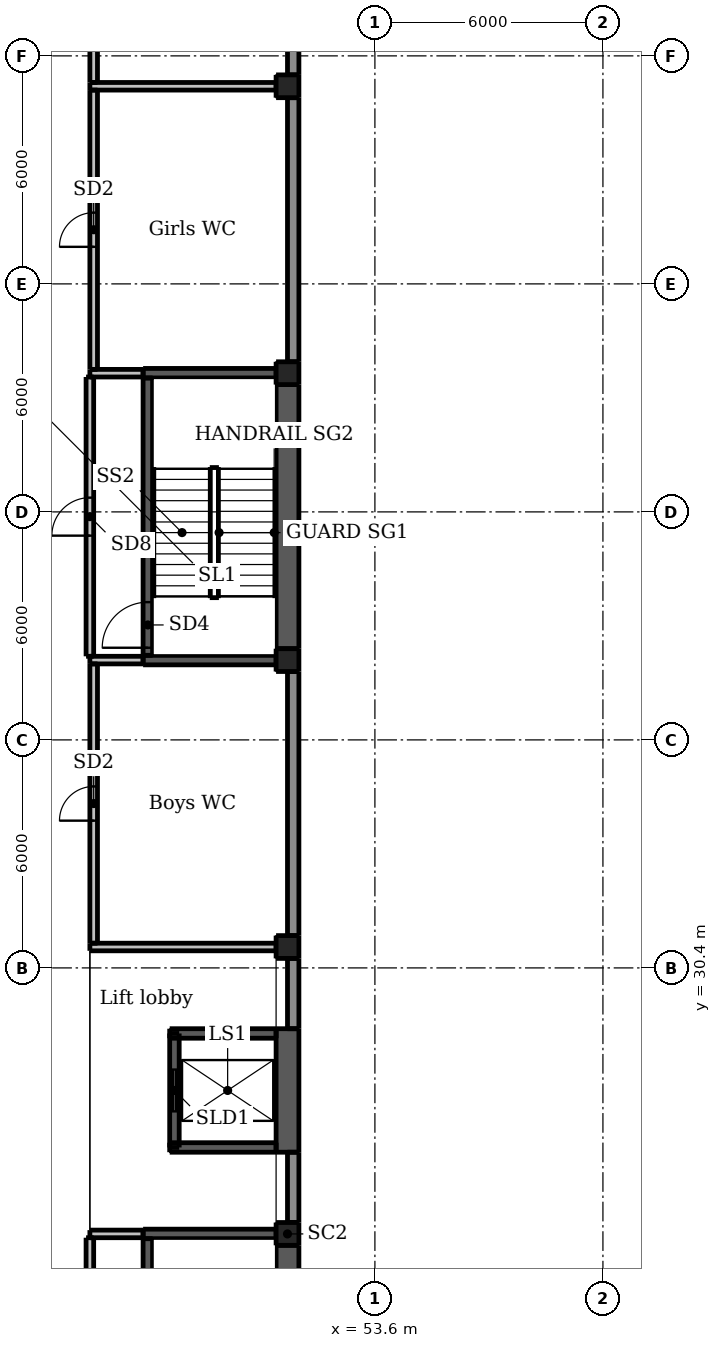
"""IFC4 building model, lengths in metres.
Left out: names, types, materials, properties, quantities, classifications, styles, units other than length and angle.
Written with IfcOpenShell. Run it as: python <this file> out.ifc"""

import sys

from ifc_helpers import new_model, si_unit, direction, frame, frame_2d, origin, origin_2d, place, context, subcontext, project, spatial, rectangle, extrude, element, fill, save


model = new_model("IFC4")
c1 = context("Model", 3, precision=1e-05, world=origin(), true_north=direction((0.0, 1.0)))
c2 = subcontext(c1, "Body", "Model", "MODEL_VIEW")
j1 = project(units=[si_unit("LENGTHUNIT", "METRE"), si_unit("PLANEANGLEUNIT", "RADIAN")], contexts=[c1])
p1 = place(None, origin())
s1 = spatial("IfcSite", under=j1, at=p1, CompositionType="ELEMENT")
p2 = place(p1, origin())
s2 = spatial("IfcBuilding", under=s1, at=p2, CompositionType="ELEMENT")
p3 = place(p2, frame((0.0, 0.0, 19.0)))
s3 = spatial("IfcBuildingStorey", under=s2, at=p3, CompositionType="ELEMENT", Elevation=19.0)
for number, where, z_axis, x_axis in (
    (1, (52.6, 30.4, 0.0), (0.0, 0.0, 1.0), (1.0, 0.0, 0.0)),
    (2, (52.6, 36.4, 0.0), (0.0, 0.0, 1.0), (1.0, 0.0, 0.0)),
    (3, (52.6, 42.4, 0.0), (0.0, 0.0, 1.0), (1.0, 0.0, 0.0)),
    (4, (52.6, 48.4, 0.0), (0.0, 0.0, 1.0), (1.0, 0.0, 0.0)),
    (5, (52.6, 54.4, 0.0), (0.0, 0.0, 1.0), (1.0, 0.0, 0.0)),
):
    element("IfcColumn", number, at=place(p3, frame(where, z_axis=z_axis, x_axis=x_axis)), inside=s3, PredefinedType="COLUMN", context=c2, shape_type="SweptSolid", body=[
        extrude(rectangle(XDim=1.2, YDim=1.2, at=origin_2d()), origin(), (0.0, 0.0, 1.0), 4.25),
    ])
p4 = place(p3, frame((55.2, 23.2, 0.0), z_axis=(0.0, 0.0, 1.0), x_axis=(1.0, 0.0, 0.0)))
e6 = element("IfcColumn", 6, at=p4, inside=s3, PredefinedType="COLUMN", context=c2, shape_type="SweptSolid", body=[
    extrude(rectangle(XDim=3.2, YDim=3.2, at=origin_2d()), origin(), (0.0, 0.0, 1.0), 4.25),
])
for number, where, z_axis, x_axis in (
    (7, (51.3, 23.4, -0.3), (0.0, 0.0, 1.0), (1.0, 0.0, 0.0)),
    (8, (51.3, 30.95, -0.3), (0.0, 0.0, 1.0), (1.0, 0.0, 0.0)),
    (9, (51.3, 38.5, -0.3), (0.0, 0.0, 1.0), (1.0, 0.0, 0.0)),
    (10, (51.3, 46.05, -0.3), (0.0, 0.0, 1.0), (1.0, 0.0, 0.0)),
    (11, (51.3, 53.6, -0.3), (0.0, 0.0, 1.0), (1.0, 0.0, 0.0)),
):
    element("IfcColumn", number, at=place(p3, frame(where, z_axis=z_axis, x_axis=x_axis)), inside=s3, PredefinedType="COLUMN", context=c2, shape_type="SweptSolid", body=[
        extrude(rectangle(XDim=0.6, YDim=0.6, at=origin_2d()), origin(), (0.0, 0.0, 1.0), 4.35),
    ])
p5 = place(p3, frame((47.625, 15.975, -0.3), z_axis=(0.0, 0.0, 1.0), x_axis=(0.0, 1.0, 0.0)))
e12 = element("IfcWall", 12, at=p5, inside=s3, PredefinedType="SHEAR", context=c2, shape_type="SweptSolid", body=[
    extrude(rectangle(XDim=7.3, YDim=0.25, at=frame_2d((3.65, 0.0))), origin(), (0.0, 0.0, 1.0), 4.8),
])
p6 = place(p5, frame((0.2, 0.0, 0.3)))
e13 = element("IfcOpeningElement", 13, at=p6, cuts=e12, PredefinedType="OPENING", context=c2, shape_type="SweptSolid", body=[
    extrude(rectangle(XDim=1.2, YDim=2.1, at=frame_2d((0.6, 1.05))), frame((0.0, 0.135, 0.0), z_axis=(0.0, -1.0, 0.0), x_axis=(1.0, 0.0, 0.0)), (0.0, 0.0, 1.0), 0.27),
])
p7 = place(p3, frame((47.5, 23.4, -0.3), z_axis=(0.0, 0.0, 1.0), x_axis=(1.0, 0.0, 0.0)))
e14 = element("IfcWall", 14, at=p7, inside=s3, PredefinedType="SHEAR", context=c2, shape_type="SweptSolid", body=[
    extrude(rectangle(XDim=3.5, YDim=0.25, at=frame_2d((1.75, 0.0))), origin(), (0.0, 0.0, 1.0), 4.8),
])
p8 = place(p3, frame((51.3, 16.15, -0.3), z_axis=(0.0, 0.0, 1.0), x_axis=(0.0, 1.0, 0.0)))
e15 = element("IfcWall", 15, at=p8, inside=s3, PredefinedType="SHEAR", context=c2, shape_type="SweptSolid", body=[
    extrude(rectangle(XDim=6.95, YDim=0.6, at=frame_2d((3.475, 0.0))), origin(), (0.0, 0.0, 1.0), 4.8),
])
p9 = place(p3, frame((47.625, 38.625, -0.3), z_axis=(0.0, 0.0, 1.0), x_axis=(0.0, 1.0, 0.0)))
e16 = element("IfcWall", 16, at=p9, inside=s3, PredefinedType="SHEAR", context=c2, shape_type="SweptSolid", body=[
    extrude(rectangle(XDim=7.3, YDim=0.25, at=frame_2d((3.65, 0.0))), origin(), (0.0, 0.0, 1.0), 4.8),
])
p10 = place(p9, frame((0.2, 0.0, 0.3)))
e17 = element("IfcOpeningElement", 17, at=p10, cuts=e16, PredefinedType="OPENING", context=c2, shape_type="SweptSolid", body=[
    extrude(rectangle(XDim=1.2, YDim=2.1, at=frame_2d((0.6, 1.05))), frame((0.0, 0.135, 0.0), z_axis=(0.0, -1.0, 0.0), x_axis=(1.0, 0.0, 0.0)), (0.0, 0.0, 1.0), 0.27),
])
for number, where, z_axis, x_axis in (
    (18, (47.5, 38.5, -0.3), (0.0, 0.0, 1.0), (1.0, 0.0, 0.0)),
    (19, (47.5, 46.05, -0.3), (0.0, 0.0, 1.0), (1.0, 0.0, 0.0)),
):
    element("IfcWall", number, at=place(p3, frame(where, z_axis=z_axis, x_axis=x_axis)), inside=s3, PredefinedType="SHEAR", context=c2, shape_type="SweptSolid", body=[
        extrude(rectangle(XDim=3.5, YDim=0.25, at=frame_2d((1.75, 0.0))), origin(), (0.0, 0.0, 1.0), 4.8),
    ])
p11 = place(p3, frame((51.3, 38.8, -0.3), z_axis=(0.0, 0.0, 1.0), x_axis=(0.0, 1.0, 0.0)))
e20 = element("IfcWall", 20, at=p11, inside=s3, PredefinedType="SHEAR", context=c2, shape_type="SweptSolid", body=[
    extrude(rectangle(XDim=6.95, YDim=0.6, at=frame_2d((3.475, 0.0))), origin(), (0.0, 0.0, 1.0), 4.8),
])
p12 = place(p3, frame((48.325, 25.675, -0.3), z_axis=(0.0, 0.0, 1.0), x_axis=(0.0, 1.0, 0.0)))
e21 = element("IfcWall", 21, at=p12, inside=s3, PredefinedType="SHEAR", context=c2, shape_type="SweptSolid", body=[
    extrude(rectangle(XDim=3.0, YDim=0.25, at=frame_2d((1.5, 0.0))), origin(), (0.0, 0.0, 1.0), 4.35),
])
p13 = place(p12, frame((0.95, 0.0, 0.3)))
e22 = element("IfcOpeningElement", 22, at=p13, cuts=e21, PredefinedType="OPENING", context=c2, shape_type="SweptSolid", body=[
    extrude(rectangle(XDim=1.1, YDim=2.1, at=frame_2d((0.55, 1.05))), frame((0.0, 0.135, 0.0), z_axis=(0.0, -1.0, 0.0), x_axis=(1.0, 0.0, 0.0)), (0.0, 0.0, 1.0), 0.27),
])
for number, where, z_axis, x_axis in (
    (23, (48.2, 25.675, -0.3), (0.0, 0.0, 1.0), (1.0, 0.0, 0.0)),
    (24, (48.2, 28.675, -0.3), (0.0, 0.0, 1.0), (1.0, 0.0, 0.0)),
):
    element("IfcWall", number, at=place(p3, frame(where, z_axis=z_axis, x_axis=x_axis)), inside=s3, PredefinedType="SHEAR", context=c2, shape_type="SweptSolid", body=[
        extrude(rectangle(XDim=2.8, YDim=0.25, at=frame_2d((1.4, 0.0))), origin(), (0.0, 0.0, 1.0), 4.35),
    ])
p14 = place(p3, frame((51.3, 25.55, -0.3), z_axis=(0.0, 0.0, 1.0), x_axis=(0.0, 1.0, 0.0)))
e25 = element("IfcWall", 25, at=p14, inside=s3, PredefinedType="SHEAR", context=c2, shape_type="SweptSolid", body=[
    extrude(rectangle(XDim=3.25, YDim=0.6, at=frame_2d((1.625, 0.0))), origin(), (0.0, 0.0, 1.0), 4.35),
])
p15 = place(p3, frame((52.125, 20.0, 0.0), z_axis=(0.0, 0.0, 1.0), x_axis=(0.0, 1.0, 0.0)))
e26 = element("IfcWall", 26, at=p15, inside=s3, PredefinedType="SOLIDWALL", context=c2, shape_type="SweptSolid", body=[
    extrude(rectangle(XDim=9.8, YDim=0.25, at=frame_2d((4.9, 0.0))), origin(), (0.0, 0.0, 1.0), 4.25),
])
for number, where, z_axis, x_axis in (
    (27, (52.125, 31.0, 0.0), (0.0, 0.0, 1.0), (0.0, 1.0, 0.0)),
    (28, (52.125, 37.0, 0.0), (0.0, 0.0, 1.0), (0.0, 1.0, 0.0)),
    (29, (52.125, 43.0, 0.0), (0.0, 0.0, 1.0), (0.0, 1.0, 0.0)),
    (30, (52.125, 49.0, 0.0), (0.0, 0.0, 1.0), (0.0, 1.0, 0.0)),
):
    element("IfcWall", number, at=place(p3, frame(where, z_axis=z_axis, x_axis=x_axis)), inside=s3, PredefinedType="SOLIDWALL", context=c2, shape_type="SweptSolid", body=[
        extrude(rectangle(XDim=4.8, YDim=0.25, at=frame_2d((2.4, 0.0))), origin(), (0.0, 0.0, 1.0), 4.25),
    ])
for number, where, z_axis, x_axis in (
    (31, (51.45, 31.25, 0.0), (0.0, 0.0, 1.0), (0.0, 1.0, 0.0)),
    (32, (51.45, 46.35, 0.0), (0.0, 0.0, 1.0), (0.0, 1.0, 0.0)),
):
    element("IfcWall", number, at=place(p3, frame(where, z_axis=z_axis, x_axis=x_axis)), inside=s3, PredefinedType="SOLIDWALL", context=c2, shape_type="SweptSolid", body=[
        extrude(rectangle(XDim=6.95, YDim=0.3, at=frame_2d((3.475, 0.0))), origin(), (0.0, 0.0, 1.0), 3.15),
    ])
p16 = place(p3, frame((51.45, 53.9, 0.0), z_axis=(0.0, 0.0, 1.0), x_axis=(0.0, 1.0, 0.0)))
e33 = element("IfcWall", 33, at=p16, inside=s3, PredefinedType="SOLIDWALL", context=c2, shape_type="SweptSolid", body=[
    extrude(rectangle(XDim=6.95, YDim=0.3, at=frame_2d((3.475, 0.0))), origin(), (0.0, 0.0, 1.0), 3.15),
])
p17 = place(p3, frame((51.45, 23.7, 0.0), z_axis=(0.0, 0.0, 1.0), x_axis=(0.0, 1.0, 0.0)))
e34 = element("IfcWall", 34, at=p17, inside=s3, PredefinedType="SOLIDWALL", context=c2, shape_type="SweptSolid", body=[
    extrude(rectangle(XDim=1.85, YDim=0.3, at=frame_2d((0.925, 0.0))), origin(), (0.0, 0.0, 1.0), 3.15),
])
p18 = place(p3, frame((51.45, 28.8, 0.0), z_axis=(0.0, 0.0, 1.0), x_axis=(0.0, 1.0, 0.0)))
e35 = element("IfcWall", 35, at=p18, inside=s3, PredefinedType="SOLIDWALL", context=c2, shape_type="SweptSolid", body=[
    extrude(rectangle(XDim=1.85, YDim=0.3, at=frame_2d((0.925, 0.0))), origin(), (0.0, 0.0, 1.0), 3.15),
])
p19 = place(p3, frame((53.2, 30.4, 0.0), z_axis=(0.0, 0.0, 1.0), x_axis=(1.0, 0.0, 0.0)))
e36 = element("IfcWall", 36, at=p19, inside=s3, PredefinedType="PARTITIONING", context=c2, shape_type="SweptSolid", body=[
    extrude(rectangle(XDim=5.95, YDim=0.15, at=frame_2d((2.975, 0.0))), origin(), (0.0, 0.0, 1.0), 3.415),
])
p20 = place(p3, frame((59.15, 30.4, 0.0), z_axis=(0.0, 0.0, 1.0), x_axis=(1.0, 0.0, 0.0)))
e37 = element("IfcWall", 37, at=p20, inside=s3, PredefinedType="PARTITIONING", context=c2, shape_type="SweptSolid", body=[
    extrude(rectangle(XDim=0.9, YDim=0.15, at=frame_2d((0.45, 0.0))), origin(), (0.0, 0.0, 1.0), 2.947),
])
p21 = place(p3, frame((60.05, 30.4, 0.0), z_axis=(0.0, 0.0, 1.0), x_axis=(1.0, 0.0, 0.0)))
e38 = element("IfcWall", 38, at=p21, inside=s3, PredefinedType="PARTITIONING", context=c2, shape_type="SweptSolid", body=[
    extrude(rectangle(XDim=5.1, YDim=0.15, at=frame_2d((2.55, 0.0))), origin(), (0.0, 0.0, 1.0), 4.25),
])
p22 = place(p21, frame((1.65, 0.0, 0.0)))
e39 = element("IfcOpeningElement", 39, at=p22, cuts=e38, PredefinedType="OPENING", context=c2, shape_type="SweptSolid", body=[
    extrude(rectangle(XDim=1.8, YDim=2.1, at=frame_2d((0.9, 1.05))), frame((0.0, 0.085, 0.0), z_axis=(0.0, -1.0, 0.0), x_axis=(1.0, 0.0, 0.0)), (0.0, 0.0, 1.0), 0.17),
])
p23 = place(p3, frame((53.2, 42.4, 0.0), z_axis=(0.0, 0.0, 1.0), x_axis=(1.0, 0.0, 0.0)))
e40 = element("IfcWall", 40, at=p23, inside=s3, PredefinedType="PARTITIONING", context=c2, shape_type="SweptSolid", body=[
    extrude(rectangle(XDim=6.325, YDim=0.1, at=frame_2d((3.163, 0.0))), origin(), (0.0, 0.0, 1.0), 3.415),
])
p24 = place(p3, frame((53.2, 54.4, 0.0), z_axis=(0.0, 0.0, 1.0), x_axis=(1.0, 0.0, 0.0)))
e41 = element("IfcWall", 41, at=p24, inside=s3, PredefinedType="PARTITIONING", context=c2, shape_type="SweptSolid", body=[
    extrude(rectangle(XDim=6.325, YDim=0.1, at=frame_2d((3.163, 0.0))), origin(), (0.0, 0.0, 1.0), 3.409),
])
p25 = place(p3, frame((59.6, 30.475, 0.0), z_axis=(0.0, 0.0, 1.0), x_axis=(0.0, 1.0, 0.0)))
e42 = element("IfcWall", 42, at=p25, inside=s3, PredefinedType="PARTITIONING", context=c2, shape_type="SweptSolid", body=[
    extrude(rectangle(XDim=5.779, YDim=0.15, at=frame_2d((2.89, 0.0))), origin(), (0.0, 0.0, 1.0), 2.947),
])
p26 = place(p3, frame((59.6, 36.259, 0.0), z_axis=(0.0, 0.0, 1.0), x_axis=(0.0, 1.0, 0.0)))
e43 = element("IfcWall", 43, at=p26, inside=s3, PredefinedType="PARTITIONING", context=c2, shape_type="SweptSolid", body=[
    extrude(rectangle(XDim=0.287, YDim=0.15, at=frame_2d((0.143, 0.0))), origin(), (0.0, 0.0, 1.0), 3.409),
])
p27 = place(p3, frame((59.6, 36.546, 0.0), z_axis=(0.0, 0.0, 1.0), x_axis=(0.0, 1.0, 0.0)))
e44 = element("IfcWall", 44, at=p27, inside=s3, PredefinedType="PARTITIONING", context=c2, shape_type="SweptSolid", body=[
    extrude(rectangle(XDim=5.708, YDim=0.15, at=frame_2d((2.854, 0.0))), origin(), (0.0, 0.0, 1.0), 4.25),
])
p28 = place(p27, frame((0.204, 0.0, 0.0)))
e45 = element("IfcOpeningElement", 45, at=p28, cuts=e44, PredefinedType="OPENING", context=c2, shape_type="SweptSolid", body=[
    extrude(rectangle(XDim=1.8, YDim=2.1, at=frame_2d((0.9, 1.05))), frame((0.0, 0.085, 0.0), z_axis=(0.0, -1.0, 0.0), x_axis=(1.0, 0.0, 0.0)), (0.0, 0.0, 1.0), 0.17),
])
p29 = place(p3, frame((59.6, 42.254, 0.0), z_axis=(0.0, 0.0, 1.0), x_axis=(0.0, 1.0, 0.0)))
e46 = element("IfcWall", 46, at=p29, inside=s3, PredefinedType="PARTITIONING", context=c2, shape_type="SweptSolid", body=[
    extrude(rectangle(XDim=0.292, YDim=0.15, at=frame_2d((0.146, 0.0))), origin(), (0.0, 0.0, 1.0), 3.415),
])
p30 = place(p3, frame((59.6, 42.546, 0.0), z_axis=(0.0, 0.0, 1.0), x_axis=(0.0, 1.0, 0.0)))
e47 = element("IfcWall", 47, at=p30, inside=s3, PredefinedType="PARTITIONING", context=c2, shape_type="SweptSolid", body=[
    extrude(rectangle(XDim=5.708, YDim=0.15, at=frame_2d((2.854, 0.0))), origin(), (0.0, 0.0, 1.0), 4.25),
])
p31 = place(p3, frame((59.6, 48.254, 0.0), z_axis=(0.0, 0.0, 1.0), x_axis=(0.0, 1.0, 0.0)))
e48 = element("IfcWall", 48, at=p31, inside=s3, PredefinedType="PARTITIONING", context=c2, shape_type="SweptSolid", body=[
    extrude(rectangle(XDim=0.292, YDim=0.15, at=frame_2d((0.146, 0.0))), origin(), (0.0, 0.0, 1.0), 3.415),
])
p32 = place(p3, frame((59.6, 48.546, 0.0), z_axis=(0.0, 0.0, 1.0), x_axis=(0.0, 1.0, 0.0)))
e49 = element("IfcWall", 49, at=p32, inside=s3, PredefinedType="PARTITIONING", context=c2, shape_type="SweptSolid", body=[
    extrude(rectangle(XDim=5.708, YDim=0.15, at=frame_2d((2.854, 0.0))), origin(), (0.0, 0.0, 1.0), 4.25),
])
p33 = place(p32, frame((0.204, 0.0, 0.0)))
e50 = element("IfcOpeningElement", 50, at=p33, cuts=e49, PredefinedType="OPENING", context=c2, shape_type="SweptSolid", body=[
    extrude(rectangle(XDim=1.8, YDim=2.1, at=frame_2d((0.9, 1.05))), frame((0.0, 0.085, 0.0), z_axis=(0.0, -1.0, 0.0), x_axis=(1.0, 0.0, 0.0)), (0.0, 0.0, 1.0), 0.17),
])
p34 = place(p3, frame((59.6, 54.254, 0.0), z_axis=(0.0, 0.0, 1.0), x_axis=(0.0, 1.0, 0.0)))
e51 = element("IfcWall", 51, at=p34, inside=s3, PredefinedType="PARTITIONING", context=c2, shape_type="SweptSolid", body=[
    extrude(rectangle(XDim=0.287, YDim=0.15, at=frame_2d((0.143, 0.0))), origin(), (0.0, 0.0, 1.0), 3.409),
])
p35 = place(p3, frame((46.2, 31.05, 0.0), z_axis=(0.0, 0.0, 1.0), x_axis=(0.0, 1.0, 0.0)))
e52 = element("IfcWall", 52, at=p35, inside=s3, PredefinedType="PARTITIONING", context=c2, shape_type="SweptSolid", body=[
    extrude(rectangle(XDim=7.35, YDim=0.2, at=frame_2d((3.675, 0.0))), origin(), (0.0, 0.0, 1.0), 2.85),
])
p36 = place(p35, frame((3.225, 0.0, 0.0)))
e53 = element("IfcOpeningElement", 53, at=p36, cuts=e52, PredefinedType="OPENING", context=c2, shape_type="SweptSolid", body=[
    extrude(rectangle(XDim=0.9, YDim=2.1, at=frame_2d((0.45, 1.05))), frame((0.0, 0.11, 0.0), z_axis=(0.0, -1.0, 0.0), x_axis=(1.0, 0.0, 0.0)), (0.0, 0.0, 1.0), 0.22),
])
p37 = place(p3, frame((46.2, 46.15, 0.0), z_axis=(0.0, 0.0, 1.0), x_axis=(0.0, 1.0, 0.0)))
e54 = element("IfcWall", 54, at=p37, inside=s3, PredefinedType="PARTITIONING", context=c2, shape_type="SweptSolid", body=[
    extrude(rectangle(XDim=7.35, YDim=0.2, at=frame_2d((3.675, 0.0))), origin(), (0.0, 0.0, 1.0), 2.85),
])
p38 = place(p37, frame((3.225, 0.0, 0.0)))
e55 = element("IfcOpeningElement", 55, at=p38, cuts=e54, PredefinedType="OPENING", context=c2, shape_type="SweptSolid", body=[
    extrude(rectangle(XDim=0.9, YDim=2.1, at=frame_2d((0.45, 1.05))), frame((0.0, 0.11, 0.0), z_axis=(0.0, -1.0, 0.0), x_axis=(1.0, 0.0, 0.0)), (0.0, 0.0, 1.0), 0.22),
])
p39 = place(p3, frame((46.2, 53.7, 0.0), z_axis=(0.0, 0.0, 1.0), x_axis=(0.0, 1.0, 0.0)))
e56 = element("IfcWall", 56, at=p39, inside=s3, PredefinedType="PARTITIONING", context=c2, shape_type="SweptSolid", body=[
    extrude(rectangle(XDim=3.0, YDim=0.2, at=frame_2d((1.5, 0.0))), origin(), (0.0, 0.0, 1.0), 2.85),
])
p40 = place(p39, frame((1.05, 0.0, 0.0)))
e57 = element("IfcOpeningElement", 57, at=p40, cuts=e56, PredefinedType="OPENING", context=c2, shape_type="SweptSolid", body=[
    extrude(rectangle(XDim=0.9, YDim=2.1, at=frame_2d((0.45, 1.05))), frame((0.0, 0.11, 0.0), z_axis=(0.0, -1.0, 0.0), x_axis=(1.0, 0.0, 0.0)), (0.0, 0.0, 1.0), 0.22),
])
p41 = place(p3, frame((46.1, 23.4, 0.0), z_axis=(0.0, 0.0, 1.0), x_axis=(1.0, 0.0, 0.0)))
e58 = element("IfcWall", 58, at=p41, inside=s3, PredefinedType="PARTITIONING", context=c2, shape_type="SweptSolid", body=[
    extrude(rectangle(XDim=1.4, YDim=0.2, at=frame_2d((0.7, 0.0))), origin(), (0.0, 0.0, 1.0), 2.85),
])
p42 = place(p3, frame((46.1, 30.95, 0.0), z_axis=(0.0, 0.0, 1.0), x_axis=(1.0, 0.0, 0.0)))
e59 = element("IfcWall", 59, at=p42, inside=s3, PredefinedType="PARTITIONING", context=c2, shape_type="SweptSolid", body=[
    extrude(rectangle(XDim=4.9, YDim=0.2, at=frame_2d((2.45, 0.0))), origin(), (0.0, 0.0, 1.0), 2.85),
])
for number, where, z_axis, x_axis in (
    (60, (46.1, 38.5, 0.0), (0.0, 0.0, 1.0), (1.0, 0.0, 0.0)),
    (61, (46.1, 46.05, 0.0), (0.0, 0.0, 1.0), (1.0, 0.0, 0.0)),
):
    element("IfcWall", number, at=place(p3, frame(where, z_axis=z_axis, x_axis=x_axis)), inside=s3, PredefinedType="PARTITIONING", context=c2, shape_type="SweptSolid", body=[
        extrude(rectangle(XDim=1.4, YDim=0.2, at=frame_2d((0.7, 0.0))), origin(), (0.0, 0.0, 1.0), 2.85),
    ])
p43 = place(p3, frame((46.1, 53.6, 0.0), z_axis=(0.0, 0.0, 1.0), x_axis=(1.0, 0.0, 0.0)))
e62 = element("IfcWall", 62, at=p43, inside=s3, PredefinedType="PARTITIONING", context=c2, shape_type="SweptSolid", body=[
    extrude(rectangle(XDim=4.9, YDim=0.2, at=frame_2d((2.45, 0.0))), origin(), (0.0, 0.0, 1.0), 2.85),
])
p44 = place(p3, frame((46.1, 15.95, 0.0), z_axis=(0.0, 0.0, 1.0), x_axis=(0.0, 1.0, 0.0)))
e63 = element("IfcWall", 63, at=p44, inside=s3, PredefinedType="PARTITIONING", context=c2, shape_type="SweptSolid", body=[
    extrude(rectangle(XDim=7.35, YDim=0.2, at=frame_2d((3.675, 0.0))), origin(), (0.0, 0.0, 1.0), 2.85),
])
p45 = place(p44, frame((3.175, 0.0, 0.0)))
e64 = element("IfcOpeningElement", 64, at=p45, cuts=e63, PredefinedType="OPENING", context=c2, shape_type="SweptSolid", body=[
    extrude(rectangle(XDim=1.0, YDim=2.1, at=frame_2d((0.5, 1.05))), frame((0.0, 0.11, 0.0), z_axis=(0.0, -1.0, 0.0), x_axis=(1.0, 0.0, 0.0)), (0.0, 0.0, 1.0), 0.22),
])
p46 = place(p3, frame((46.1, 38.6, 0.0), z_axis=(0.0, 0.0, 1.0), x_axis=(0.0, 1.0, 0.0)))
e65 = element("IfcWall", 65, at=p46, inside=s3, PredefinedType="PARTITIONING", context=c2, shape_type="SweptSolid", body=[
    extrude(rectangle(XDim=7.35, YDim=0.2, at=frame_2d((3.675, 0.0))), origin(), (0.0, 0.0, 1.0), 2.85),
])
p47 = place(p46, frame((3.175, 0.0, 0.0)))
e66 = element("IfcOpeningElement", 66, at=p47, cuts=e65, PredefinedType="OPENING", context=c2, shape_type="SweptSolid", body=[
    extrude(rectangle(XDim=1.0, YDim=2.1, at=frame_2d((0.5, 1.05))), frame((0.0, 0.11, 0.0), z_axis=(0.0, -1.0, 0.0), x_axis=(1.0, 0.0, 0.0)), (0.0, 0.0, 1.0), 0.22),
])
p48 = place(p28, origin())
e67 = element("IfcDoor", 67, at=p48, inside=s3, OperationType="DOUBLE_DOOR_SINGLE_SWING", PredefinedType="DOOR", context=c2, shape_type="SweptSolid", body=[
    extrude(rectangle(XDim=1.8, YDim=2.1, at=frame_2d((0.9, 1.05))), frame((0.0, 0.025, 0.0), z_axis=(0.0, -1.0, 0.0), x_axis=(1.0, 0.0, 0.0)), (0.0, 0.0, 1.0), 0.05),
])
fill(e45, e67)
p49 = place(p33, origin())
e68 = element("IfcDoor", 68, at=p49, inside=s3, OperationType="DOUBLE_DOOR_SINGLE_SWING", PredefinedType="DOOR", context=c2, shape_type="SweptSolid", body=[
    extrude(rectangle(XDim=1.8, YDim=2.1, at=frame_2d((0.9, 1.05))), frame((0.0, 0.025, 0.0), z_axis=(0.0, -1.0, 0.0), x_axis=(1.0, 0.0, 0.0)), (0.0, 0.0, 1.0), 0.05),
])
fill(e50, e68)
p50 = place(p36, origin())
e69 = element("IfcDoor", 69, at=p50, inside=s3, OperationType="SINGLE_SWING_LEFT", PredefinedType="DOOR", context=c2, shape_type="SweptSolid", body=[
    extrude(rectangle(XDim=0.9, YDim=2.1, at=frame_2d((0.45, 1.05))), frame((0.0, 0.025, 0.0), z_axis=(0.0, -1.0, 0.0), x_axis=(1.0, 0.0, 0.0)), (0.0, 0.0, 1.0), 0.05),
])
fill(e53, e69)
p51 = place(p38, origin())
e70 = element("IfcDoor", 70, at=p51, inside=s3, OperationType="SINGLE_SWING_LEFT", PredefinedType="DOOR", context=c2, shape_type="SweptSolid", body=[
    extrude(rectangle(XDim=0.9, YDim=2.1, at=frame_2d((0.45, 1.05))), frame((0.0, 0.025, 0.0), z_axis=(0.0, -1.0, 0.0), x_axis=(1.0, 0.0, 0.0)), (0.0, 0.0, 1.0), 0.05),
])
fill(e55, e70)
p52 = place(p47, origin())
e71 = element("IfcDoor", 71, at=p52, inside=s3, OperationType="SINGLE_SWING_LEFT", PredefinedType="DOOR", context=c2, shape_type="SweptSolid", body=[
    extrude(rectangle(XDim=1.0, YDim=2.1, at=frame_2d((0.5, 1.05))), frame((0.0, 0.025, 0.0), z_axis=(0.0, -1.0, 0.0), x_axis=(1.0, 0.0, 0.0)), (0.0, 0.0, 1.0), 0.05),
])
fill(e66, e71)
p53 = place(p10, origin())
e72 = element("IfcDoor", 72, at=p53, inside=s3, OperationType="SINGLE_SWING_LEFT", PredefinedType="DOOR", context=c2, shape_type="SweptSolid", body=[
    extrude(rectangle(XDim=1.2, YDim=2.1, at=frame_2d((0.6, 1.05))), frame((0.0, 0.025, 0.0), z_axis=(0.0, -1.0, 0.0), x_axis=(1.0, 0.0, 0.0)), (0.0, 0.0, 1.0), 0.05),
])
fill(e17, e72)
p54 = place(p13, origin())
e73 = element("IfcDoor", 73, at=p54, inside=s3, OperationType="SLIDING_TO_LEFT", PredefinedType="DOOR", context=c2, shape_type="SweptSolid", body=[
    extrude(rectangle(XDim=1.1, YDim=2.1, at=frame_2d((0.55, 1.05))), frame((0.0, 0.025, 0.0), z_axis=(0.0, -1.0, 0.0), x_axis=(1.0, 0.0, 0.0)), (0.0, 0.0, 1.0), 0.05),
])
fill(e22, e73)
save(model, sys.argv[1])
